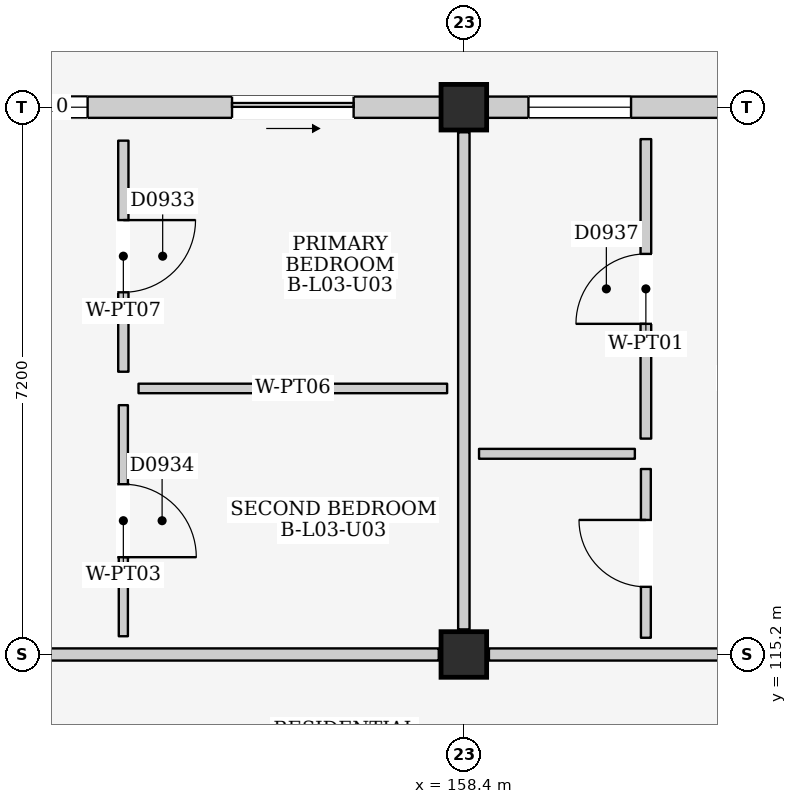
"""IFC4 building model, lengths in metres.
Left out: names, types, materials, properties, quantities, classifications, styles, units other than length and angle.
Written with IfcOpenShell. Run it as: python <this file> out.ifc"""

import sys

from ifc_helpers import new_model, si_unit, direction, frame, frame_2d, origin, origin_2d, place, context, subcontext, project, spatial, rectangle, extrude, element, fill, save


model = new_model("IFC4")
c1 = context("Model", 3, precision=1e-05, world=origin(), true_north=direction((0.0, 1.0)))
c2 = subcontext(c1, "Body", "Model", "MODEL_VIEW")
j1 = project(units=[si_unit("LENGTHUNIT", "METRE"), si_unit("PLANEANGLEUNIT", "RADIAN")], contexts=[c1])
p1 = place(None, origin())
s1 = spatial("IfcSite", under=j1, at=p1, CompositionType="ELEMENT")
p2 = place(p1, origin())
s2 = spatial("IfcBuilding", under=s1, at=p2, CompositionType="ELEMENT")
p3 = place(p2, frame((0.0, 0.0, 12.2)))
s3 = spatial("IfcBuildingStorey", under=s2, at=p3, CompositionType="ELEMENT", Elevation=12.2)
for number, where, z_axis, x_axis in (
    (1, (158.4, 115.2, 0.0), (0.0, 0.0, 1.0), (1.0, 0.0, 0.0)),
    (2, (158.4, 122.4, 0.0), (0.0, 0.0, 1.0), (1.0, 0.0, 0.0)),
):
    element("IfcColumn", number, at=place(p3, frame(where, z_axis=z_axis, x_axis=x_axis)), inside=s3, PredefinedType="COLUMN", context=c2, shape_type="SweptSolid", body=[
        extrude(rectangle(XDim=0.6, YDim=0.6, at=origin_2d()), origin(), (0.0, 0.0, 1.0), 3.2),
    ])
p4 = place(p3, frame((151.5, 122.4, 0.0), z_axis=(0.0, 0.0, 1.0), x_axis=(1.0, 0.0, 0.0)))
e3 = element("IfcWall", 3, at=p4, inside=s3, PredefinedType="ELEMENTEDWALL", context=c2, shape_type="SweptSolid", body=[
    extrude(rectangle(XDim=6.6, YDim=0.28, at=frame_2d((3.3, 0.0))), origin(), (0.0, 0.0, 1.0), 2.445),
])
p5 = place(p4, frame((3.85, 0.0, 0.0)))
e4 = element("IfcOpeningElement", 4, at=p5, cuts=e3, PredefinedType="OPENING", context=c2, shape_type="SweptSolid", body=[
    extrude(rectangle(XDim=1.6, YDim=2.12, at=frame_2d((0.8, 1.06))), frame((0.0, 0.155, 0.0), z_axis=(0.0, -1.0, 0.0), x_axis=(1.0, 0.0, 0.0)), (0.0, 0.0, 1.0), 0.31),
])
p6 = place(p4, frame((0.55, 0.0, 0.9)))
e5 = element("IfcOpeningElement", 5, at=p6, cuts=e3, PredefinedType="OPENING", context=c2, shape_type="SweptSolid", body=[
    extrude(rectangle(XDim=1.4, YDim=1.2, at=frame_2d((0.7, 0.6))), frame((0.0, 0.155, 0.0), z_axis=(0.0, -1.0, 0.0), x_axis=(1.0, 0.0, 0.0)), (0.0, 0.0, 1.0), 0.31),
])
p7 = place(p3, frame((158.7, 122.4, 0.0), z_axis=(0.0, 0.0, 1.0), x_axis=(1.0, 0.0, 0.0)))
e6 = element("IfcWall", 6, at=p7, inside=s3, PredefinedType="ELEMENTEDWALL", context=c2, shape_type="SweptSolid", body=[
    extrude(rectangle(XDim=6.6, YDim=0.28, at=frame_2d((3.3, 0.0))), origin(), (0.0, 0.0, 1.0), 2.445),
])
p8 = place(p7, frame((3.85, 0.0, 0.0)))
e7 = element("IfcOpeningElement", 7, at=p8, cuts=e6, PredefinedType="OPENING", context=c2, shape_type="SweptSolid", body=[
    extrude(rectangle(XDim=1.5, YDim=2.12, at=frame_2d((0.75, 1.06))), frame((0.0, 0.155, 0.0), z_axis=(0.0, -1.0, 0.0), x_axis=(1.0, 0.0, 0.0)), (0.0, 0.0, 1.0), 0.31),
])
p9 = place(p7, frame((0.55, 0.0, 0.835)))
e8 = element("IfcOpeningElement", 8, at=p9, cuts=e6, PredefinedType="OPENING", context=c2, shape_type="SweptSolid", body=[
    extrude(rectangle(XDim=1.35, YDim=1.5, at=frame_2d((0.675, 0.75))), frame((0.0, 0.155, 0.0), z_axis=(0.0, -1.0, 0.0), x_axis=(1.0, 0.0, 0.0)), (0.0, 0.0, 1.0), 0.31),
])
p10 = place(p3, frame((151.53, 115.2, 0.0), z_axis=(0.0, 0.0, 1.0), x_axis=(1.0, 0.0, 0.0)))
e9 = element("IfcWall", 9, at=p10, inside=s3, PredefinedType="PARTITIONING", context=c2, shape_type="SweptSolid", body=[
    extrude(rectangle(XDim=6.54, YDim=0.16, at=frame_2d((3.27, 0.0))), origin(), (0.0, 0.0, 1.0), 2.365),
])
p11 = place(p10, frame((0.18, 0.0, 0.0)))
e10 = element("IfcOpeningElement", 10, at=p11, cuts=e9, PredefinedType="OPENING", context=c2, shape_type="SweptSolid", body=[
    extrude(rectangle(XDim=1.0, YDim=2.15, at=frame_2d((0.5, 1.075))), frame((0.0, 0.095, 0.0), z_axis=(0.0, -1.0, 0.0), x_axis=(1.0, 0.0, 0.0)), (0.0, 0.0, 1.0), 0.19),
])
p12 = place(p3, frame((158.4, 115.53, 0.0), z_axis=(0.0, 0.0, 1.0), x_axis=(0.0, 1.0, 0.0)))
e11 = element("IfcWall", 11, at=p12, inside=s3, PredefinedType="PARTITIONING", context=c2, shape_type="SweptSolid", body=[
    extrude(rectangle(XDim=6.54, YDim=0.15, at=frame_2d((3.27, 0.0))), origin(), (0.0, 0.0, 1.0), 2.415),
])
p13 = place(p3, frame((153.92, 118.92, 0.0), z_axis=(0.0, 0.0, 1.0), x_axis=(0.0, 1.0, 0.0)))
e12 = element("IfcWall", 12, at=p13, inside=s3, PredefinedType="PARTITIONING", context=c2, shape_type="SweptSolid", body=[
    extrude(rectangle(XDim=3.04, YDim=0.135, at=frame_2d((1.52, 0.0))), origin(), (0.0, 0.0, 1.0), 2.98),
])
p14 = place(p13, frame((1.045, 0.0, 0.0)))
e13 = element("IfcOpeningElement", 13, at=p14, cuts=e12, PredefinedType="OPENING", context=c2, shape_type="SweptSolid", body=[
    extrude(rectangle(XDim=0.95, YDim=2.15, at=frame_2d((0.475, 1.075))), frame((0.0, 0.083, 0.0), z_axis=(0.0, -1.0, 0.0), x_axis=(1.0, 0.0, 0.0)), (0.0, 0.0, 1.0), 0.165),
])
p15 = place(p3, frame((154.12, 118.7, 0.0), z_axis=(0.0, 0.0, 1.0), x_axis=(1.0, 0.0, 0.0)))
e14 = element("IfcWall", 14, at=p15, inside=s3, PredefinedType="PARTITIONING", context=c2, shape_type="SweptSolid", body=[
    extrude(rectangle(XDim=4.06, YDim=0.125, at=frame_2d((2.03, 0.0))), origin(), (0.0, 0.0, 1.0), 2.98),
])
p16 = place(p3, frame((153.92, 115.44, 0.0), z_axis=(0.0, 0.0, 1.0), x_axis=(0.0, 1.0, 0.0)))
e15 = element("IfcWall", 15, at=p16, inside=s3, PredefinedType="PARTITIONING", context=c2, shape_type="SweptSolid", body=[
    extrude(rectangle(XDim=3.04, YDim=0.12, at=frame_2d((1.52, 0.0))), origin(), (0.0, 0.0, 1.0), 2.98),
])
p17 = place(p16, frame((1.04, 0.0, 0.0)))
e16 = element("IfcOpeningElement", 16, at=p17, cuts=e15, PredefinedType="OPENING", context=c2, shape_type="SweptSolid", body=[
    extrude(rectangle(XDim=0.96, YDim=2.15, at=frame_2d((0.48, 1.075))), frame((0.0, 0.075, 0.0), z_axis=(0.0, -1.0, 0.0), x_axis=(1.0, 0.0, 0.0)), (0.0, 0.0, 1.0), 0.15),
])
p18 = place(p3, frame((158.73, 115.2, 0.0), z_axis=(0.0, 0.0, 1.0), x_axis=(1.0, 0.0, 0.0)))
e17 = element("IfcWall", 17, at=p18, inside=s3, PredefinedType="PARTITIONING", context=c2, shape_type="SweptSolid", body=[
    extrude(rectangle(XDim=6.54, YDim=0.16, at=frame_2d((3.27, 0.0))), origin(), (0.0, 0.0, 1.0), 2.365),
])
p19 = place(p18, frame((4.12, 0.0, 0.0)))
e18 = element("IfcOpeningElement", 18, at=p19, cuts=e17, PredefinedType="OPENING", context=c2, shape_type="SweptSolid", body=[
    extrude(rectangle(XDim=1.0, YDim=2.15, at=frame_2d((0.5, 1.075))), frame((0.0, 0.095, 0.0), z_axis=(0.0, -1.0, 0.0), x_axis=(1.0, 0.0, 0.0)), (0.0, 0.0, 1.0), 0.19),
])
p20 = place(p3, frame((158.6, 117.84, 0.0), z_axis=(0.0, 0.0, 1.0), x_axis=(1.0, 0.0, 0.0)))
e19 = element("IfcWall", 19, at=p20, inside=s3, PredefinedType="PARTITIONING", context=c2, shape_type="SweptSolid", body=[
    extrude(rectangle(XDim=2.05, YDim=0.13, at=frame_2d((1.025, 0.0))), origin(), (0.0, 0.0, 1.0), 2.98),
])
p21 = place(p3, frame((160.795, 115.42, 0.0), z_axis=(0.0, 0.0, 1.0), x_axis=(0.0, 1.0, 0.0)))
e20 = element("IfcWall", 20, at=p21, inside=s3, PredefinedType="PARTITIONING", context=c2, shape_type="SweptSolid", body=[
    extrude(rectangle(XDim=2.22, YDim=0.13, at=frame_2d((1.11, 0.0))), origin(), (0.0, 0.0, 1.0), 2.98),
])
p22 = place(p21, frame((0.67, 0.0, 0.0)))
e21 = element("IfcOpeningElement", 21, at=p22, cuts=e20, PredefinedType="OPENING", context=c2, shape_type="SweptSolid", body=[
    extrude(rectangle(XDim=0.88, YDim=2.1, at=frame_2d((0.44, 1.05))), frame((0.0, 0.08, 0.0), z_axis=(0.0, -1.0, 0.0), x_axis=(1.0, 0.0, 0.0)), (0.0, 0.0, 1.0), 0.16),
])
p23 = place(p3, frame((160.795, 118.04, 0.0), z_axis=(0.0, 0.0, 1.0), x_axis=(0.0, 1.0, 0.0)))
e22 = element("IfcWall", 22, at=p23, inside=s3, PredefinedType="PARTITIONING", context=c2, shape_type="SweptSolid", body=[
    extrude(rectangle(XDim=3.94, YDim=0.14, at=frame_2d((1.97, 0.0))), origin(), (0.0, 0.0, 1.0), 2.98),
])
p24 = place(p23, frame((1.51, 0.0, 0.0)))
e23 = element("IfcOpeningElement", 23, at=p24, cuts=e22, PredefinedType="OPENING", context=c2, shape_type="SweptSolid", body=[
    extrude(rectangle(XDim=0.92, YDim=2.1, at=frame_2d((0.46, 1.05))), frame((0.0, 0.085, 0.0), z_axis=(0.0, -1.0, 0.0), x_axis=(1.0, 0.0, 0.0)), (0.0, 0.0, 1.0), 0.17),
])
p25 = place(p5, frame((1.6, 0.0, 0.0), z_axis=(0.0, 0.0, 1.0), x_axis=(-1.0, 0.0, 0.0)))
e24 = element("IfcDoor", 24, at=p25, inside=s3, OperationType="SLIDING_TO_RIGHT", PredefinedType="DOOR", context=c2, shape_type="SweptSolid", body=[
    extrude(rectangle(XDim=1.6, YDim=2.12, at=frame_2d((0.8, 1.06))), frame((0.0, 0.025, 0.0), z_axis=(0.0, -1.0, 0.0), x_axis=(1.0, 0.0, 0.0)), (0.0, 0.0, 1.0), 0.05),
])
fill(e4, e24)
p26 = place(p6, origin())
e25 = element("IfcWindow", 25, at=p26, inside=s3, PartitioningType="DOUBLE_PANEL_HORIZONTAL", PredefinedType="WINDOW", context=c2, shape_type="SweptSolid", body=[
    extrude(rectangle(XDim=1.4, YDim=1.2, at=frame_2d((0.7, 0.6))), frame((0.0, 0.03, 0.0), z_axis=(0.0, -1.0, 0.0), x_axis=(1.0, 0.0, 0.0)), (0.0, 0.0, 1.0), 0.06),
])
fill(e5, e25)
p27 = place(p9, origin())
e26 = element("IfcWindow", 26, at=p27, inside=s3, PartitioningType="SINGLE_PANEL", PredefinedType="WINDOW", context=c2, shape_type="SweptSolid", body=[
    extrude(rectangle(XDim=1.35, YDim=1.5, at=frame_2d((0.675, 0.75))), frame((0.0, 0.03, 0.0), z_axis=(0.0, -1.0, 0.0), x_axis=(1.0, 0.0, 0.0)), (0.0, 0.0, 1.0), 0.06),
])
fill(e8, e26)
p28 = place(p14, frame((0.95, 0.0, 0.0), z_axis=(0.0, 0.0, 1.0), x_axis=(-1.0, 0.0, 0.0)))
e27 = element("IfcDoor", 27, at=p28, inside=s3, OperationType="SINGLE_SWING_LEFT", PredefinedType="DOOR", context=c2, shape_type="SweptSolid", body=[
    extrude(rectangle(XDim=0.95, YDim=2.15, at=frame_2d((0.475, 1.075))), frame((0.0, 0.025, 0.0), z_axis=(0.0, -1.0, 0.0), x_axis=(1.0, 0.0, 0.0)), (0.0, 0.0, 1.0), 0.05),
])
fill(e13, e27)
p29 = place(p17, frame((0.96, 0.0, 0.0), z_axis=(0.0, 0.0, 1.0), x_axis=(-1.0, 0.0, 0.0)))
e28 = element("IfcDoor", 28, at=p29, inside=s3, OperationType="SINGLE_SWING_RIGHT", PredefinedType="DOOR", context=c2, shape_type="SweptSolid", body=[
    extrude(rectangle(XDim=0.96, YDim=2.15, at=frame_2d((0.48, 1.075))), frame((0.0, 0.025, 0.0), z_axis=(0.0, -1.0, 0.0), x_axis=(1.0, 0.0, 0.0)), (0.0, 0.0, 1.0), 0.05),
])
fill(e16, e28)
p30 = place(p22, origin())
e29 = element("IfcDoor", 29, at=p30, inside=s3, OperationType="SINGLE_SWING_RIGHT", PredefinedType="DOOR", context=c2, shape_type="SweptSolid", body=[
    extrude(rectangle(XDim=0.88, YDim=2.1, at=frame_2d((0.44, 1.05))), frame((0.0, 0.025, 0.0), z_axis=(0.0, -1.0, 0.0), x_axis=(1.0, 0.0, 0.0)), (0.0, 0.0, 1.0), 0.05),
])
fill(e21, e29)
p31 = place(p24, origin())
e30 = element("IfcDoor", 30, at=p31, inside=s3, OperationType="SINGLE_SWING_LEFT", PredefinedType="DOOR", context=c2, shape_type="SweptSolid", body=[
    extrude(rectangle(XDim=0.92, YDim=2.1, at=frame_2d((0.46, 1.05))), frame((0.0, 0.025, 0.0), z_axis=(0.0, -1.0, 0.0), x_axis=(1.0, 0.0, 0.0)), (0.0, 0.0, 1.0), 0.05),
])
fill(e23, e30)
save(model, sys.argv[1])
